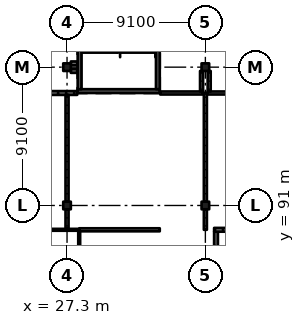
"""IFC4 building model, lengths in metres.
Left out: names, types, materials, properties, quantities, classifications, styles, units other than length and angle.
Written with IfcOpenShell. Run it as: python <this file> out.ifc"""

import sys

from ifc_helpers import new_model, si_unit, direction, frame, frame_2d, origin, origin_2d, place, context, subcontext, project, spatial, rectangle, extrude, element, fill, save


model = new_model("IFC4")
c1 = context("Model", 3, precision=1e-05, world=origin(), true_north=direction((0.0, 1.0)))
c2 = subcontext(c1, "Body", "Model", "MODEL_VIEW")
j1 = project(units=[si_unit("LENGTHUNIT", "METRE"), si_unit("PLANEANGLEUNIT", "RADIAN")], contexts=[c1])
p1 = place(None, origin())
s1 = spatial("IfcSite", under=j1, at=p1, CompositionType="ELEMENT")
p2 = place(p1, origin())
s2 = spatial("IfcBuilding", under=s1, at=p2, CompositionType="ELEMENT")
p3 = place(p2, frame((0.0, 0.0, 24.57)))
s3 = spatial("IfcBuildingStorey", under=s2, at=p3, CompositionType="ELEMENT", Elevation=24.57)
for number, where, z_axis, x_axis in (
    (1, (27.3, 91.0, 0.0), (0.0, 0.0, 1.0), (1.0, 0.0, 0.0)),
    (2, (27.3, 100.1, 0.0), (0.0, 0.0, 1.0), (1.0, 0.0, 0.0)),
    (3, (36.4, 91.0, 0.0), (0.0, 0.0, 1.0), (1.0, 0.0, 0.0)),
    (4, (36.4, 100.1, 0.0), (0.0, 0.0, 1.0), (1.0, 0.0, 0.0)),
):
    element("IfcColumn", number, at=place(p3, frame(where, z_axis=z_axis, x_axis=x_axis)), inside=s3, PredefinedType="COLUMN", context=c2, shape_type="SweptSolid", body=[
        extrude(rectangle(XDim=0.5, YDim=0.5, at=origin_2d()), origin(), (0.0, 0.0, 1.0), 4.55),
    ])
p4 = place(p3, frame((33.4, 98.525, 0.0), z_axis=(0.0, 0.0, 1.0), x_axis=(-1.0, 0.0, 0.0)))
e5 = element("IfcWall", 5, at=p4, inside=s3, PredefinedType="SHEAR", context=c2, shape_type="SweptSolid", body=[
    extrude(rectangle(XDim=5.4, YDim=0.25, at=frame_2d((2.7, 0.0))), origin(), (0.0, 0.0, 1.0), 4.55),
])
p5 = place(p4, frame((1.5, 0.0, 0.0)))
e6 = element("IfcOpeningElement", 6, at=p5, cuts=e5, PredefinedType="OPENING", context=c2, shape_type="SweptSolid", body=[
    extrude(rectangle(XDim=2.4, YDim=2.1, at=frame_2d((1.2, 1.05))), frame((0.0, 0.135, 0.0), z_axis=(0.0, -1.0, 0.0), x_axis=(1.0, 0.0, 0.0)), (0.0, 0.0, 1.0), 0.27),
])
for number, where, z_axis, x_axis in (
    (7, (28.125, 108.25, 0.0), (0.0, 0.0, 1.0), (0.0, -1.0, 0.0)),
    (8, (33.275, 108.25, 0.0), (0.0, 0.0, 1.0), (0.0, -1.0, 0.0)),
):
    element("IfcWall", number, at=place(p3, frame(where, z_axis=z_axis, x_axis=x_axis)), inside=s3, PredefinedType="SHEAR", context=c2, shape_type="SweptSolid", body=[
        extrude(rectangle(XDim=9.6, YDim=0.25, at=frame_2d((4.8, 0.0))), origin(), (0.0, 0.0, 1.0), 4.55),
    ])
p6 = place(p3, frame((24.33, 98.4, 0.0), z_axis=(0.0, 0.0, 1.0), x_axis=(1.0, 0.0, 0.0)))
e9 = element("IfcWall", 9, at=p6, inside=s3, PredefinedType="SOLIDWALL", context=c2, shape_type="SweptSolid", body=[
    extrude(rectangle(XDim=3.64, YDim=0.25, at=frame_2d((1.82, 0.0))), origin(), (0.0, 0.0, 1.0), 4.35),
])
p7 = place(p6, frame((0.95, 0.0, 0.0)))
e10 = element("IfcOpeningElement", 10, at=p7, cuts=e9, PredefinedType="OPENING", context=c2, shape_type="SweptSolid", body=[
    extrude(rectangle(XDim=1.0, YDim=2.1, at=frame_2d((0.5, 1.05))), frame((0.0, 0.135, 0.0), z_axis=(0.0, -1.0, 0.0), x_axis=(1.0, 0.0, 0.0)), (0.0, 0.0, 1.0), 0.27),
])
p8 = place(p3, frame((24.3, 89.4, 0.0), z_axis=(0.0, 0.0, 1.0), x_axis=(1.0, 0.0, 0.0)))
e11 = element("IfcWall", 11, at=p8, inside=s3, PredefinedType="PARTITIONING", context=c2, shape_type="SweptSolid", body=[
    extrude(rectangle(XDim=3.8, YDim=0.125, at=frame_2d((1.9, 0.0))), origin(), (0.0, 0.0, 1.0), 4.35),
])
p9 = place(p8, frame((1.05, 0.0, 0.0)))
e12 = element("IfcOpeningElement", 12, at=p9, cuts=e11, PredefinedType="OPENING", context=c2, shape_type="SweptSolid", body=[
    extrude(rectangle(XDim=0.9, YDim=2.1, at=frame_2d((0.45, 1.05))), frame((0.0, 0.073, 0.0), z_axis=(0.0, -1.0, 0.0), x_axis=(1.0, 0.0, 0.0)), (0.0, 0.0, 1.0), 0.145),
])
p10 = place(p3, frame((27.3, 90.75, 0.0), z_axis=(0.0, 0.0, 1.0), x_axis=(0.0, -1.0, 0.0)))
e13 = element("IfcWall", 13, at=p10, inside=s3, PredefinedType="PARTITIONING", context=c2, shape_type="SweptSolid", body=[
    extrude(rectangle(XDim=1.288, YDim=0.2, at=frame_2d((0.644, 0.0))), origin(), (0.0, 0.0, 1.0), 3.6),
])
p11 = place(p3, frame((27.3, 98.275, 0.0), z_axis=(0.0, 0.0, 1.0), x_axis=(0.0, -1.0, 0.0)))
e14 = element("IfcWall", 14, at=p11, inside=s3, PredefinedType="PARTITIONING", context=c2, shape_type="SweptSolid", body=[
    extrude(rectangle(XDim=7.025, YDim=0.2, at=frame_2d((3.512, 0.0))), origin(), (0.0, 0.0, 1.0), 3.6),
])
p12 = place(p11, frame((0.85, 0.0, 0.0)))
e15 = element("IfcOpeningElement", 15, at=p12, cuts=e14, PredefinedType="OPENING", context=c2, shape_type="SweptSolid", body=[
    extrude(rectangle(XDim=1.8, YDim=2.4, at=frame_2d((0.9, 1.2))), frame((0.0, 0.11, 0.0), z_axis=(0.0, -1.0, 0.0), x_axis=(1.0, 0.0, 0.0)), (0.0, 0.0, 1.0), 0.22),
])
p13 = place(p11, frame((4.35, 0.0, 0.0)))
e16 = element("IfcOpeningElement", 16, at=p13, cuts=e14, PredefinedType="OPENING", context=c2, shape_type="SweptSolid", body=[
    extrude(rectangle(XDim=1.8, YDim=2.4, at=frame_2d((0.9, 1.2))), frame((0.0, 0.11, 0.0), z_axis=(0.0, -1.0, 0.0), x_axis=(1.0, 0.0, 0.0)), (0.0, 0.0, 1.0), 0.22),
])
for number, where, z_axis, x_axis in (
    (17, (27.55, 99.85, 0.0), (0.0, 0.0, 1.0), (1.0, 0.0, 0.0)),
    (18, (27.97, 100.35, 0.0), (0.0, 0.0, 1.0), (-1.0, 0.0, 0.0)),
):
    element("IfcWall", number, at=place(p3, frame(where, z_axis=z_axis, x_axis=x_axis)), inside=s3, PredefinedType="SOLIDWALL", context=c2, shape_type="SweptSolid", body=[
        extrude(rectangle(XDim=0.42, YDim=0.25, at=frame_2d((0.21, 0.0))), origin(), (0.0, 0.0, 1.0), 4.35),
    ])
p14 = place(p3, frame((28.1, 89.3, 0.0), z_axis=(0.0, 0.0, 1.0), x_axis=(0.0, -1.0, 0.0)))
e19 = element("IfcWall", 19, at=p14, inside=s3, PredefinedType="PARTITIONING", context=c2, shape_type="SweptSolid", body=[
    extrude(rectangle(XDim=2.87, YDim=0.125, at=frame_2d((1.435, 0.0))), origin(), (0.0, 0.0, 1.0), 4.35),
])
p15 = place(p3, frame((33.4, 89.4, 0.0), z_axis=(0.0, 0.0, 1.0), x_axis=(-1.0, 0.0, 0.0)))
e20 = element("IfcWall", 20, at=p15, inside=s3, PredefinedType="PARTITIONING", context=c2, shape_type="SweptSolid", body=[
    extrude(rectangle(XDim=5.3, YDim=0.2, at=frame_2d((2.65, 0.0))), origin(), (0.0, 0.0, 1.0), 4.35),
])
p16 = place(p15, frame((1.75, 0.0, 0.0)))
e21 = element("IfcOpeningElement", 21, at=p16, cuts=e20, PredefinedType="OPENING", context=c2, shape_type="SweptSolid", body=[
    extrude(rectangle(XDim=1.8, YDim=2.4, at=frame_2d((0.9, 1.2))), frame((0.0, 0.11, 0.0), z_axis=(0.0, -1.0, 0.0), x_axis=(1.0, 0.0, 0.0)), (0.0, 0.0, 1.0), 0.22),
])
p17 = place(p3, frame((33.43, 98.4, 0.0), z_axis=(0.0, 0.0, 1.0), x_axis=(1.0, 0.0, 0.0)))
e22 = element("IfcWall", 22, at=p17, inside=s3, PredefinedType="PARTITIONING", context=c2, shape_type="SweptSolid", body=[
    extrude(rectangle(XDim=2.82, YDim=0.2, at=frame_2d((1.41, 0.0))), origin(), (0.0, 0.0, 1.0), 4.35),
])
p18 = place(p17, frame((0.55, 0.0, 0.0)))
e23 = element("IfcOpeningElement", 23, at=p18, cuts=e22, PredefinedType="OPENING", context=c2, shape_type="SweptSolid", body=[
    extrude(rectangle(XDim=1.8, YDim=2.4, at=frame_2d((0.9, 1.2))), frame((0.0, 0.11, 0.0), z_axis=(0.0, -1.0, 0.0), x_axis=(1.0, 0.0, 0.0)), (0.0, 0.0, 1.0), 0.22),
])
for number, where, z_axis, x_axis in (
    (24, (36.15, 98.5, 0.0), (0.0, 0.0, 1.0), (0.0, 1.0, 0.0)),
    (25, (36.4, 90.75, 0.0), (0.0, 0.0, 1.0), (0.0, -1.0, 0.0)),
):
    element("IfcWall", number, at=place(p3, frame(where, z_axis=z_axis, x_axis=x_axis)), inside=s3, PredefinedType="PARTITIONING", context=c2, shape_type="SweptSolid", body=[
        extrude(rectangle(XDim=1.35, YDim=0.2, at=frame_2d((0.675, 0.0))), origin(), (0.0, 0.0, 1.0), 3.6),
    ])
p19 = place(p3, frame((36.4, 98.4, 0.0), z_axis=(0.0, 0.0, 1.0), x_axis=(0.0, -1.0, 0.0)))
e26 = element("IfcWall", 26, at=p19, inside=s3, PredefinedType="PARTITIONING", context=c2, shape_type="SweptSolid", body=[
    extrude(rectangle(XDim=7.15, YDim=0.2, at=frame_2d((3.575, 0.0))), origin(), (0.0, 0.0, 1.0), 3.6),
])
p20 = place(p19, frame((0.85, 0.0, 0.0)))
e27 = element("IfcOpeningElement", 27, at=p20, cuts=e26, PredefinedType="OPENING", context=c2, shape_type="SweptSolid", body=[
    extrude(rectangle(XDim=1.8, YDim=2.4, at=frame_2d((0.9, 1.2))), frame((0.0, 0.11, 0.0), z_axis=(0.0, -1.0, 0.0), x_axis=(1.0, 0.0, 0.0)), (0.0, 0.0, 1.0), 0.22),
])
p21 = place(p19, frame((4.45, 0.0, 0.0)))
e28 = element("IfcOpeningElement", 28, at=p21, cuts=e26, PredefinedType="OPENING", context=c2, shape_type="SweptSolid", body=[
    extrude(rectangle(XDim=1.8, YDim=2.4, at=frame_2d((0.9, 1.2))), frame((0.0, 0.11, 0.0), z_axis=(0.0, -1.0, 0.0), x_axis=(1.0, 0.0, 0.0)), (0.0, 0.0, 1.0), 0.22),
])
p22 = place(p3, frame((36.55, 98.4, 0.0), z_axis=(0.0, 0.0, 1.0), x_axis=(1.0, 0.0, 0.0)))
e29 = element("IfcWall", 29, at=p22, inside=s3, PredefinedType="PARTITIONING", context=c2, shape_type="SweptSolid", body=[
    extrude(rectangle(XDim=4.15, YDim=0.2, at=frame_2d((2.075, 0.0))), origin(), (0.0, 0.0, 1.0), 4.35),
])
p23 = place(p22, frame((1.15, 0.0, 0.0)))
e30 = element("IfcOpeningElement", 30, at=p23, cuts=e29, PredefinedType="OPENING", context=c2, shape_type="SweptSolid", body=[
    extrude(rectangle(XDim=1.8, YDim=2.4, at=frame_2d((0.9, 1.2))), frame((0.0, 0.11, 0.0), z_axis=(0.0, -1.0, 0.0), x_axis=(1.0, 0.0, 0.0)), (0.0, 0.0, 1.0), 0.22),
])
p24 = place(p3, frame((36.65, 99.85, 0.0), z_axis=(0.0, 0.0, 1.0), x_axis=(0.0, -1.0, 0.0)))
e31 = element("IfcWall", 31, at=p24, inside=s3, PredefinedType="PARTITIONING", context=c2, shape_type="SweptSolid", body=[
    extrude(rectangle(XDim=1.35, YDim=0.2, at=frame_2d((0.675, 0.0))), origin(), (0.0, 0.0, 1.0), 3.6),
])
p25 = place(p3, frame((37.1, 89.275, 0.0), z_axis=(0.0, 0.0, 1.0), x_axis=(0.0, -1.0, 0.0)))
e32 = element("IfcWall", 32, at=p25, inside=s3, PredefinedType="SOLIDWALL", context=c2, shape_type="SweptSolid", body=[
    extrude(rectangle(XDim=7.0, YDim=0.25, at=frame_2d((3.5, 0.0))), origin(), (0.0, 0.0, 1.0), 4.35),
])
p26 = place(p3, frame((40.7, 89.4, 0.0), z_axis=(0.0, 0.0, 1.0), x_axis=(-1.0, 0.0, 0.0)))
e33 = element("IfcWall", 33, at=p26, inside=s3, PredefinedType="SOLIDWALL", context=c2, shape_type="SweptSolid", body=[
    extrude(rectangle(XDim=3.725, YDim=0.25, at=frame_2d((1.862, 0.0))), origin(), (0.0, 0.0, 1.0), 4.35),
])
p27 = place(p26, frame((1.35, 0.0, 0.0)))
e34 = element("IfcOpeningElement", 34, at=p27, cuts=e33, PredefinedType="OPENING", context=c2, shape_type="SweptSolid", body=[
    extrude(rectangle(XDim=1.0, YDim=2.1, at=frame_2d((0.5, 1.05))), frame((0.0, 0.135, 0.0), z_axis=(0.0, -1.0, 0.0), x_axis=(1.0, 0.0, 0.0)), (0.0, 0.0, 1.0), 0.27),
])
p28 = place(p12, origin())
e35 = element("IfcDoor", 35, at=p28, inside=s3, OperationType="DOUBLE_DOOR_SINGLE_SWING", PredefinedType="DOOR", context=c2, shape_type="SweptSolid", body=[
    extrude(rectangle(XDim=1.8, YDim=2.4, at=frame_2d((0.9, 1.2))), frame((0.0, 0.025, 0.0), z_axis=(0.0, -1.0, 0.0), x_axis=(1.0, 0.0, 0.0)), (0.0, 0.0, 1.0), 0.05),
])
fill(e15, e35)
p29 = place(p13, origin())
e36 = element("IfcDoor", 36, at=p29, inside=s3, OperationType="DOUBLE_DOOR_SINGLE_SWING", PredefinedType="DOOR", context=c2, shape_type="SweptSolid", body=[
    extrude(rectangle(XDim=1.8, YDim=2.4, at=frame_2d((0.9, 1.2))), frame((0.0, 0.025, 0.0), z_axis=(0.0, -1.0, 0.0), x_axis=(1.0, 0.0, 0.0)), (0.0, 0.0, 1.0), 0.05),
])
fill(e16, e36)
p30 = place(p20, origin())
e37 = element("IfcDoor", 37, at=p30, inside=s3, OperationType="DOUBLE_DOOR_SINGLE_SWING", PredefinedType="DOOR", context=c2, shape_type="SweptSolid", body=[
    extrude(rectangle(XDim=1.8, YDim=2.4, at=frame_2d((0.9, 1.2))), frame((0.0, 0.025, 0.0), z_axis=(0.0, -1.0, 0.0), x_axis=(1.0, 0.0, 0.0)), (0.0, 0.0, 1.0), 0.05),
])
fill(e27, e37)
p31 = place(p21, origin())
e38 = element("IfcDoor", 38, at=p31, inside=s3, OperationType="DOUBLE_DOOR_SINGLE_SWING", PredefinedType="DOOR", context=c2, shape_type="SweptSolid", body=[
    extrude(rectangle(XDim=1.8, YDim=2.4, at=frame_2d((0.9, 1.2))), frame((0.0, 0.025, 0.0), z_axis=(0.0, -1.0, 0.0), x_axis=(1.0, 0.0, 0.0)), (0.0, 0.0, 1.0), 0.05),
])
fill(e28, e38)
p32 = place(p16, origin())
e39 = element("IfcDoor", 39, at=p32, inside=s3, OperationType="DOUBLE_DOOR_SINGLE_SWING", PredefinedType="DOOR", context=c2, shape_type="SweptSolid", body=[
    extrude(rectangle(XDim=1.8, YDim=2.4, at=frame_2d((0.9, 1.2))), frame((0.0, 0.025, 0.0), z_axis=(0.0, -1.0, 0.0), x_axis=(1.0, 0.0, 0.0)), (0.0, 0.0, 1.0), 0.05),
])
fill(e21, e39)
p33 = place(p18, origin())
e40 = element("IfcDoor", 40, at=p33, inside=s3, OperationType="DOUBLE_DOOR_SINGLE_SWING", PredefinedType="DOOR", context=c2, shape_type="SweptSolid", body=[
    extrude(rectangle(XDim=1.8, YDim=2.4, at=frame_2d((0.9, 1.2))), frame((0.0, 0.025, 0.0), z_axis=(0.0, -1.0, 0.0), x_axis=(1.0, 0.0, 0.0)), (0.0, 0.0, 1.0), 0.05),
])
fill(e23, e40)
p34 = place(p5, origin())
e41 = element("IfcDoor", 41, at=p34, inside=s3, OperationType="DOUBLE_DOOR_SINGLE_SWING", PredefinedType="DOOR", context=c2, shape_type="SweptSolid", body=[
    extrude(rectangle(XDim=2.4, YDim=2.1, at=frame_2d((1.2, 1.05))), frame((0.0, 0.025, 0.0), z_axis=(0.0, -1.0, 0.0), x_axis=(1.0, 0.0, 0.0)), (0.0, 0.0, 1.0), 0.05),
])
fill(e6, e41)
save(model, sys.argv[1])
